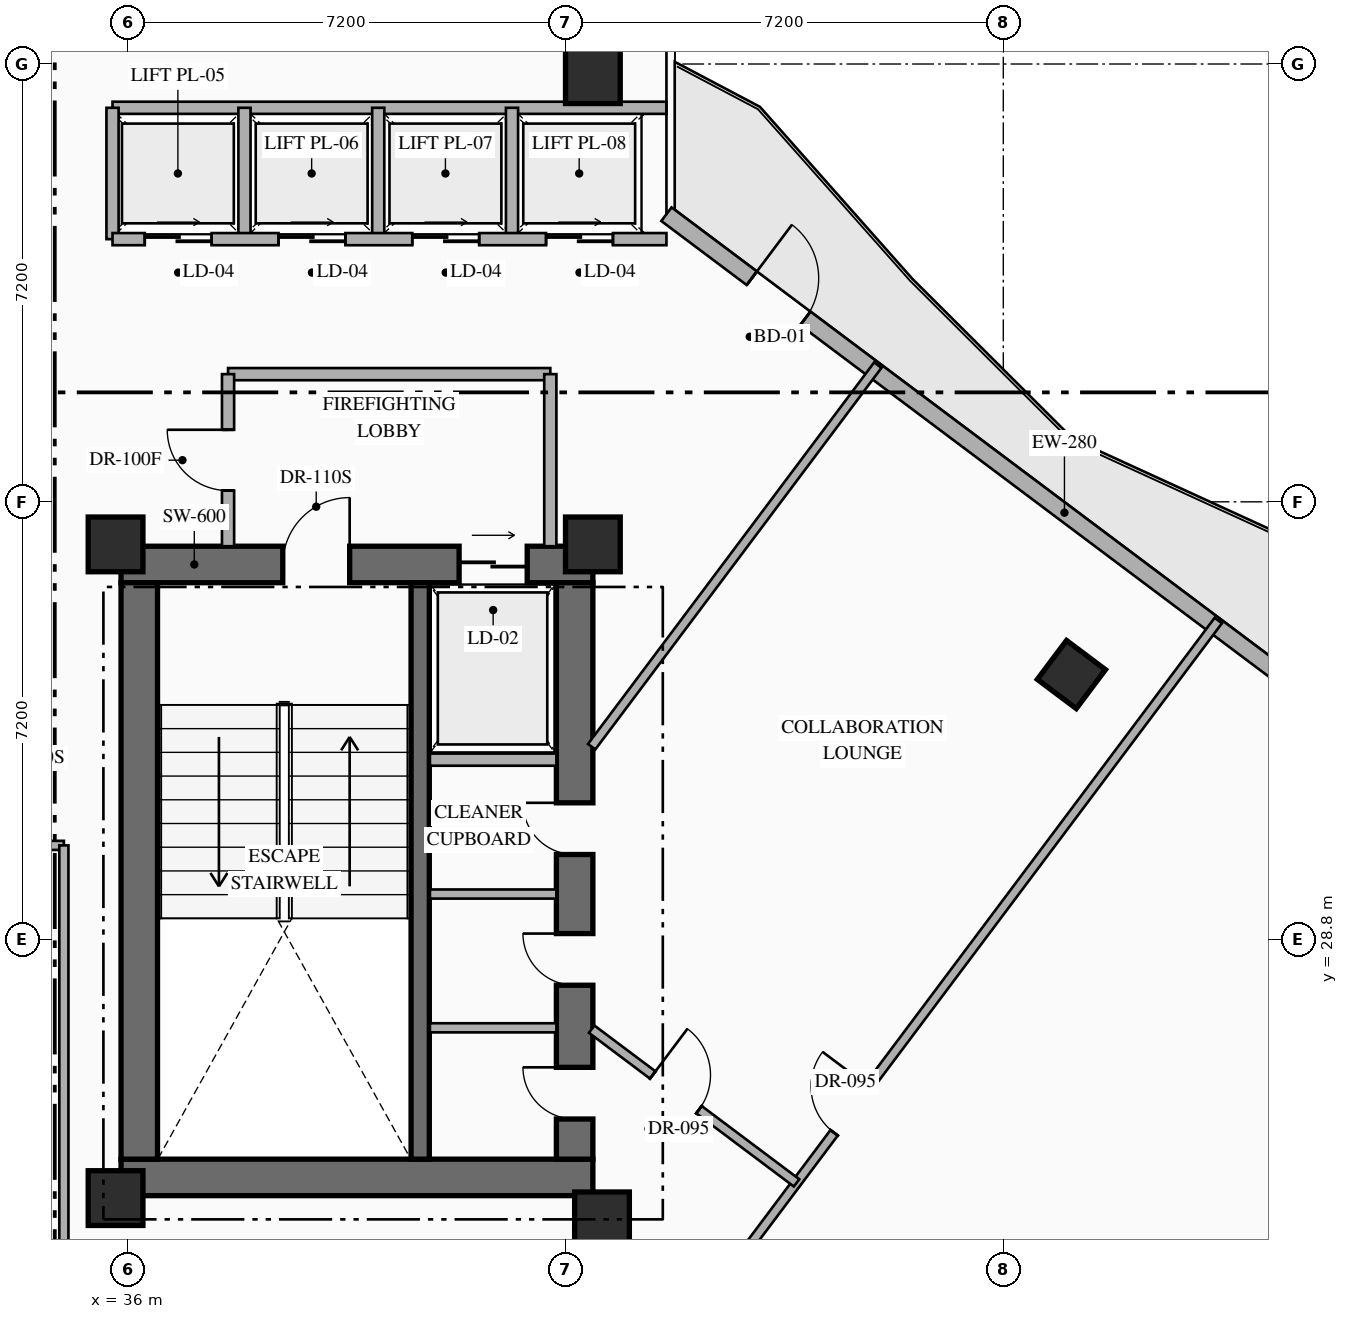
"""IFC4 building model, lengths in metres.
Left out: names, types, materials, properties, quantities, classifications, styles, units other than length and angle.
Written with IfcOpenShell. Run it as: python <this file> out.ifc"""

import sys

from ifc_helpers import new_model, si_unit, direction, frame, frame_2d, origin, origin_2d, place, context, subcontext, project, spatial, rectangle, hollow_rectangle, extrude, element, fill, save


model = new_model("IFC4")
c1 = context("Model", 3, precision=1e-05, world=origin(), true_north=direction((0.0, 1.0)))
c2 = subcontext(c1, "Body", "Model", "MODEL_VIEW")
j1 = project(units=[si_unit("LENGTHUNIT", "METRE"), si_unit("PLANEANGLEUNIT", "RADIAN")], contexts=[c1])
p1 = place(None, origin())
s1 = spatial("IfcSite", under=j1, at=p1, CompositionType="ELEMENT")
p2 = place(p1, origin())
s2 = spatial("IfcBuilding", under=s1, at=p2, CompositionType="ELEMENT")
p3 = place(p2, frame((0.0, 0.0, 170.85)))
s3 = spatial("IfcBuildingStorey", under=s2, at=p3, CompositionType="ELEMENT", Elevation=170.85)
p4 = place(p3, frame((35.89, 24.89, 0.0), z_axis=(0.0, 0.0, 1.0), x_axis=(1.0, 0.0, 0.0)))
e1 = element("IfcWall", 1, at=p4, inside=s3, PredefinedType="SHEAR", context=c2, shape_type="SweptSolid", body=[
    extrude(rectangle(XDim=7.76, YDim=0.6, at=frame_2d((3.88, 0.0))), origin(), (0.0, 0.0, 1.0), 3.6),
])
p5 = place(p3, frame((35.89, 34.97, 0.0), z_axis=(0.0, 0.0, 1.0), x_axis=(1.0, 0.0, 0.0)))
e2 = element("IfcWall", 2, at=p5, inside=s3, PredefinedType="SHEAR", context=c2, shape_type="SweptSolid", body=[
    extrude(rectangle(XDim=7.76, YDim=0.6, at=frame_2d((3.88, 0.0))), origin(), (0.0, 0.0, 1.0), 3.6),
])
p6 = place(p5, frame((2.66, 0.0, 0.0)))
e3 = element("IfcOpeningElement", 3, at=p6, cuts=e2, PredefinedType="OPENING", context=c2, shape_type="SweptSolid", body=[
    extrude(rectangle(XDim=1.1, YDim=2.2, at=frame_2d((0.55, 1.1))), frame((0.0, 0.31, 0.0), z_axis=(0.0, -1.0, 0.0), x_axis=(1.0, 0.0, 0.0)), (0.0, 0.0, 1.0), 0.62),
])
p7 = place(p5, frame((5.56, 0.0, 0.0)))
e4 = element("IfcOpeningElement", 4, at=p7, cuts=e2, PredefinedType="OPENING", context=c2, shape_type="SweptSolid", body=[
    extrude(rectangle(XDim=1.12, YDim=2.15, at=frame_2d((0.56, 1.075))), frame((0.0, 0.31, 0.0), z_axis=(0.0, -1.0, 0.0), x_axis=(1.0, 0.0, 0.0)), (0.0, 0.0, 1.0), 0.62),
])
p8 = place(p3, frame((36.19, 25.19, 0.0), z_axis=(0.0, 0.0, 1.0), x_axis=(0.0, 1.0, 0.0)))
e5 = element("IfcWall", 5, at=p8, inside=s3, PredefinedType="SHEAR", context=c2, shape_type="SweptSolid", body=[
    extrude(rectangle(XDim=9.48, YDim=0.6, at=frame_2d((4.74, 0.0))), origin(), (0.0, 0.0, 1.0), 3.6),
])
p9 = place(p3, frame((43.35, 25.19, 0.0), z_axis=(0.0, 0.0, 1.0), x_axis=(0.0, 1.0, 0.0)))
e6 = element("IfcWall", 6, at=p9, inside=s3, PredefinedType="SHEAR", context=c2, shape_type="SweptSolid", body=[
    extrude(rectangle(XDim=9.48, YDim=0.6, at=frame_2d((4.74, 0.0))), origin(), (0.0, 0.0, 1.0), 3.6),
])
p10 = place(p9, frame((0.66, 0.0, 0.0)))
e7 = element("IfcOpeningElement", 7, at=p10, cuts=e6, PredefinedType="OPENING", context=c2, shape_type="SweptSolid", body=[
    extrude(rectangle(XDim=0.85, YDim=2.08, at=frame_2d((0.425, 1.04))), frame((0.0, 0.31, 0.0), z_axis=(0.0, -1.0, 0.0), x_axis=(1.0, 0.0, 0.0)), (0.0, 0.0, 1.0), 0.62),
])
p11 = place(p9, frame((2.86, 0.0, 0.0)))
e8 = element("IfcOpeningElement", 8, at=p11, cuts=e6, PredefinedType="OPENING", context=c2, shape_type="SweptSolid", body=[
    extrude(rectangle(XDim=0.85, YDim=2.08, at=frame_2d((0.425, 1.04))), frame((0.0, 0.31, 0.0), z_axis=(0.0, -1.0, 0.0), x_axis=(1.0, 0.0, 0.0)), (0.0, 0.0, 1.0), 0.62),
])
p12 = place(p9, frame((5.01, 0.0, 0.0)))
e9 = element("IfcOpeningElement", 9, at=p12, cuts=e6, PredefinedType="OPENING", context=c2, shape_type="SweptSolid", body=[
    extrude(rectangle(XDim=0.85, YDim=2.08, at=frame_2d((0.425, 1.04))), frame((0.0, 0.31, 0.0), z_axis=(0.0, -1.0, 0.0), x_axis=(1.0, 0.0, 0.0)), (0.0, 0.0, 1.0), 0.62),
])
p13 = place(p3, frame((40.81, 25.19, 0.0), z_axis=(0.0, 0.0, 1.0), x_axis=(0.0, 1.0, 0.0)))
e10 = element("IfcWall", 10, at=p13, inside=s3, PredefinedType="SHEAR", context=c2, shape_type="SweptSolid", body=[
    extrude(rectangle(XDim=9.48, YDim=0.3, at=frame_2d((4.74, 0.0))), origin(), (0.0, 0.0, 1.0), 3.6),
])
for number, where, z_axis, x_axis in (
    (11, (35.8, 24.55, 0.0), (0.0, 0.0, 1.0), (1.0, 0.0, 0.0)),
    (12, (43.8, 24.2, 0.0), (0.0, 0.0, 1.0), (1.0, 0.0, 0.0)),
    (13, (35.8, 35.3, 0.0), (0.0, 0.0, 1.0), (1.0, 0.0, 0.0)),
    (14, (43.65, 35.3, 0.0), (0.0, 0.0, 1.0), (1.0, 0.0, 0.0)),
    (15, (43.65, 43.0, 0.0), (0.0, 0.0, 1.0), (1.0, 0.0, 0.0)),
):
    element("IfcColumn", number, at=place(p3, frame(where, z_axis=z_axis, x_axis=x_axis)), inside=s3, PredefinedType="COLUMN", context=c2, shape_type="SweptSolid", body=[
        extrude(rectangle(XDim=0.9, YDim=0.9, at=origin_2d()), origin(), (0.0, 0.0, 1.0), 3.6),
    ])
p14 = place(p3, frame((51.52, 33.16, 0.0), z_axis=(0.0, 0.0, 1.0), x_axis=(0.799999996291, -0.600000004945, 0.0)))
e16 = element("IfcColumn", 16, at=p14, inside=s3, PredefinedType="COLUMN", context=c2, shape_type="SweptSolid", body=[
    extrude(hollow_rectangle(XDim=0.8, YDim=0.8, WallThickness=0.032, at=origin_2d()), origin(), (0.0, 0.0, 1.0), 3.6),
])
p15 = place(p3, frame((44.86, 40.73, 0.0), z_axis=(0.0, 0.0, 1.0), x_axis=(0.800007624502, -0.599989833863, 0.0)))
e17 = element("IfcWall", 17, at=p15, inside=s3, PredefinedType="STANDARD", context=c2, shape_type="SweptSolid", body=[
    extrude(rectangle(XDim=19.212, YDim=0.28, at=frame_2d((9.606, 0.0))), origin(), (0.0, 0.0, 1.0), 3.35),
])
p16 = place(p15, frame((1.755, 0.0, 0.0)))
e18 = element("IfcOpeningElement", 18, at=p16, cuts=e17, PredefinedType="OPENING", context=c2, shape_type="SweptSolid", body=[
    extrude(rectangle(XDim=1.1, YDim=2.2, at=frame_2d((0.55, 1.1))), frame((0.0, 0.15, 0.0), z_axis=(0.0, -1.0, 0.0), x_axis=(1.0, 0.0, 0.0)), (0.0, 0.0, 1.0), 0.3),
])
p17 = place(p15, frame((13.509, 0.0, 0.85)))
e19 = element("IfcOpeningElement", 19, at=p17, cuts=e17, PredefinedType="OPENING", context=c2, shape_type="SweptSolid", body=[
    extrude(rectangle(XDim=1.8, YDim=2.1, at=frame_2d((0.9, 1.05))), frame((0.0, 0.15, 0.0), z_axis=(0.0, -1.0, 0.0), x_axis=(1.0, 0.0, 0.0)), (0.0, 0.0, 1.0), 0.3),
])
p18 = place(p3, frame((40.97, 31.76, 0.0), z_axis=(0.0, 0.0, 1.0), x_axis=(1.0, 0.0, 0.0)))
e20 = element("IfcWall", 20, at=p18, inside=s3, PredefinedType="STANDARD", context=c2, shape_type="SweptSolid", body=[
    extrude(rectangle(XDim=2.08, YDim=0.2, at=frame_2d((1.04, 0.0))), origin(), (0.0, 0.0, 1.0), 3.35),
])
for number, where, z_axis, x_axis in (
    (21, (40.97, 27.35, 0.0), (0.0, 0.0, 1.0), (1.0, 0.0, 0.0)),
    (22, (40.97, 29.55, 0.0), (0.0, 0.0, 1.0), (1.0, 0.0, 0.0)),
):
    element("IfcWall", number, at=place(p3, frame(where, z_axis=z_axis, x_axis=x_axis)), inside=s3, PredefinedType="PARTITIONING", context=c2, shape_type="SweptSolid", body=[
        extrude(rectangle(XDim=2.08, YDim=0.15, at=frame_2d((1.04, 0.0))), origin(), (0.0, 0.0, 1.0), 3.35),
    ])
p19 = place(p3, frame((37.65, 38.1, 0.0), z_axis=(0.0, 0.0, 1.0), x_axis=(1.0, 0.0, 0.0)))
e23 = element("IfcWall", 23, at=p19, inside=s3, PredefinedType="STANDARD", context=c2, shape_type="SweptSolid", body=[
    extrude(rectangle(XDim=5.3, YDim=0.2, at=frame_2d((2.65, 0.0))), origin(), (0.0, 0.0, 1.0), 3.35),
])
p20 = place(p3, frame((42.95, 35.27, 0.0), z_axis=(0.0, 0.0, 1.0), x_axis=(0.0, 1.0, 0.0)))
e24 = element("IfcWall", 24, at=p20, inside=s3, PredefinedType="STANDARD", context=c2, shape_type="SweptSolid", body=[
    extrude(rectangle(XDim=2.83, YDim=0.2, at=frame_2d((1.415, 0.0))), origin(), (0.0, 0.0, 1.0), 3.35),
])
p21 = place(p3, frame((37.65, 35.27, 0.0), z_axis=(0.0, 0.0, 1.0), x_axis=(0.0, 1.0, 0.0)))
e25 = element("IfcWall", 25, at=p21, inside=s3, PredefinedType="STANDARD", context=c2, shape_type="SweptSolid", body=[
    extrude(rectangle(XDim=2.83, YDim=0.2, at=frame_2d((1.415, 0.0))), origin(), (0.0, 0.0, 1.0), 3.35),
])
p22 = place(p21, frame((0.915, 0.0, 0.0)))
e26 = element("IfcOpeningElement", 26, at=p22, cuts=e25, PredefinedType="OPENING", context=c2, shape_type="SweptSolid", body=[
    extrude(rectangle(XDim=1.0, YDim=2.2, at=frame_2d((0.5, 1.1))), frame((0.0, 0.11, 0.0), z_axis=(0.0, -1.0, 0.0), x_axis=(1.0, 0.0, 0.0)), (0.0, 0.0, 1.0), 0.22),
])
p23 = place(p3, frame((35.75, 42.48, 0.0), z_axis=(0.0, 0.0, 1.0), x_axis=(1.0, 0.0, 0.0)))
e27 = element("IfcWall", 27, at=p23, inside=s3, PredefinedType="STANDARD", context=c2, shape_type="SweptSolid", body=[
    extrude(rectangle(XDim=9.11, YDim=0.2, at=frame_2d((4.555, 0.0))), origin(), (0.0, 0.0, 1.0), 3.35),
])
for number, where, z_axis, x_axis in (
    (28, (35.75, 40.32, 0.0), (0.0, 0.0, 1.0), (0.0, 1.0, 0.0)),
    (29, (37.92, 40.32, 0.0), (0.0, 0.0, 1.0), (0.0, 1.0, 0.0)),
    (30, (40.12, 40.32, 0.0), (0.0, 0.0, 1.0), (0.0, 1.0, 0.0)),
    (31, (42.32, 40.32, 0.0), (0.0, 0.0, 1.0), (0.0, 1.0, 0.0)),
):
    element("IfcWall", number, at=place(p3, frame(where, z_axis=z_axis, x_axis=x_axis)), inside=s3, PredefinedType="STANDARD", context=c2, shape_type="SweptSolid", body=[
        extrude(rectangle(XDim=2.16, YDim=0.2, at=frame_2d((1.08, 0.0))), origin(), (0.0, 0.0, 1.0), 3.35),
    ])
p24 = place(p3, frame((35.75, 40.32, 0.0), z_axis=(0.0, 0.0, 1.0), x_axis=(1.0, 0.0, 0.0)))
e32 = element("IfcWall", 32, at=p24, inside=s3, PredefinedType="STANDARD", context=c2, shape_type="SweptSolid", body=[
    extrude(rectangle(XDim=9.11, YDim=0.2, at=frame_2d((4.555, 0.0))), origin(), (0.0, 0.0, 1.0), 3.35),
])
p25 = place(p24, frame((0.53, 0.0, 0.0)))
e33 = element("IfcOpeningElement", 33, at=p25, cuts=e32, PredefinedType="OPENING", context=c2, shape_type="SweptSolid", body=[
    extrude(rectangle(XDim=1.1, YDim=2.18, at=frame_2d((0.55, 1.09))), frame((0.0, 0.11, 0.0), z_axis=(0.0, -1.0, 0.0), x_axis=(1.0, 0.0, 0.0)), (0.0, 0.0, 1.0), 0.22),
])
p26 = place(p24, frame((2.73, 0.0, 0.0)))
e34 = element("IfcOpeningElement", 34, at=p26, cuts=e32, PredefinedType="OPENING", context=c2, shape_type="SweptSolid", body=[
    extrude(rectangle(XDim=1.1, YDim=2.18, at=frame_2d((0.55, 1.09))), frame((0.0, 0.11, 0.0), z_axis=(0.0, -1.0, 0.0), x_axis=(1.0, 0.0, 0.0)), (0.0, 0.0, 1.0), 0.22),
])
p27 = place(p24, frame((4.93, 0.0, 0.0)))
e35 = element("IfcOpeningElement", 35, at=p27, cuts=e32, PredefinedType="OPENING", context=c2, shape_type="SweptSolid", body=[
    extrude(rectangle(XDim=1.1, YDim=2.18, at=frame_2d((0.55, 1.09))), frame((0.0, 0.11, 0.0), z_axis=(0.0, -1.0, 0.0), x_axis=(1.0, 0.0, 0.0)), (0.0, 0.0, 1.0), 0.22),
])
p28 = place(p24, frame((7.13, 0.0, 0.0)))
e36 = element("IfcOpeningElement", 36, at=p28, cuts=e32, PredefinedType="OPENING", context=c2, shape_type="SweptSolid", body=[
    extrude(rectangle(XDim=1.1, YDim=2.18, at=frame_2d((0.55, 1.09))), frame((0.0, 0.11, 0.0), z_axis=(0.0, -1.0, 0.0), x_axis=(1.0, 0.0, 0.0)), (0.0, 0.0, 1.0), 0.22),
])
p29 = place(p3, frame((25.55, 30.35, 0.0), z_axis=(0.0, 0.0, 1.0), x_axis=(1.0, 0.0, 0.0)))
e37 = element("IfcWall", 37, at=p29, inside=s3, PredefinedType="PARTITIONING", context=c2, shape_type="SweptSolid", body=[
    extrude(rectangle(XDim=9.4, YDim=0.15, at=frame_2d((4.7, 0.0))), origin(), (0.0, 0.0, 1.0), 3.35),
])
p30 = place(p29, frame((7.638, 0.0, 0.0)))
e38 = element("IfcOpeningElement", 38, at=p30, cuts=e37, PredefinedType="OPENING", context=c2, shape_type="SweptSolid", body=[
    extrude(rectangle(XDim=1.0, YDim=2.15, at=frame_2d((0.5, 1.075))), frame((0.0, 0.085, 0.0), z_axis=(0.0, -1.0, 0.0), x_axis=(1.0, 0.0, 0.0)), (0.0, 0.0, 1.0), 0.17),
])
p31 = place(p3, frame((34.95, 23.2, 0.0), z_axis=(0.0, 0.0, 1.0), x_axis=(0.0, 1.0, 0.0)))
e39 = element("IfcWall", 39, at=p31, inside=s3, PredefinedType="PARTITIONING", context=c2, shape_type="SweptSolid", body=[
    extrude(rectangle(XDim=7.15, YDim=0.15, at=frame_2d((3.575, 0.0))), origin(), (0.0, 0.0, 1.0), 3.35),
])
p32 = place(p3, frame((41.87, 17.96, 0.0), z_axis=(0.0, 0.0, 1.0), x_axis=(0.599994172676, 0.80000437046, 0.0)))
e40 = element("IfcWall", 40, at=p32, inside=s3, PredefinedType="PARTITIONING", context=c2, shape_type="SweptSolid", body=[
    extrude(rectangle(XDim=20.11, YDim=0.15, at=frame_2d((10.055, 0.0))), origin(), (0.0, 0.0, 1.0), 3.35),
])
p33 = place(p32, frame((9.58, 0.0, 0.0)))
e41 = element("IfcOpeningElement", 41, at=p33, cuts=e40, PredefinedType="OPENING", context=c2, shape_type="SweptSolid", body=[
    extrude(rectangle(XDim=0.95, YDim=2.15, at=frame_2d((0.475, 1.075))), frame((0.0, 0.085, 0.0), z_axis=(0.0, -1.0, 0.0), x_axis=(1.0, 0.0, 0.0)), (0.0, 0.0, 1.0), 0.17),
])
p34 = place(p3, frame((43.63, 27.328, 0.0), z_axis=(0.0, 0.0, 1.0), x_axis=(0.799972182084, -0.600037088764, 0.0)))
e42 = element("IfcWall", 42, at=p34, inside=s3, PredefinedType="PARTITIONING", context=c2, shape_type="SweptSolid", body=[
    extrude(rectangle(XDim=4.213, YDim=0.15, at=frame_2d((2.106, 0.0))), origin(), (0.0, 0.0, 1.0), 3.045),
])
p35 = place(p34, frame((1.256, 0.0, 0.0)))
e43 = element("IfcOpeningElement", 43, at=p35, cuts=e42, PredefinedType="OPENING", context=c2, shape_type="SweptSolid", body=[
    extrude(rectangle(XDim=0.95, YDim=2.15, at=frame_2d((0.475, 1.075))), frame((0.0, 0.085, 0.0), z_axis=(0.0, -1.0, 0.0), x_axis=(1.0, 0.0, 0.0)), (0.0, 0.0, 1.0), 0.17),
])
p36 = place(p3, frame((43.63, 31.973, 0.0), z_axis=(0.0, 0.0, 1.0), x_axis=(0.599975099311, 0.800018674911, 0.0)))
e44 = element("IfcWall", 44, at=p36, inside=s3, PredefinedType="PARTITIONING", context=c2, shape_type="SweptSolid", body=[
    extrude(rectangle(XDim=7.844, YDim=0.15, at=frame_2d((3.922, 0.0))), origin(), (0.0, 0.0, 1.0), 3.35),
])
p37 = place(p3, frame((27.91, 26.68, 0.0), z_axis=(0.0, 0.0, 1.0), x_axis=(0.800005938517, -0.599992081896, 0.0)))
e45 = element("IfcWall", 45, at=p37, inside=s3, PredefinedType="PARTITIONING", context=c2, shape_type="SweptSolid", body=[
    extrude(rectangle(XDim=14.8, YDim=0.15, at=frame_2d((7.4, 0.0))), origin(), (0.0, 0.0, 1.0), 3.35),
])
p38 = place(p37, frame((9.281, 0.0, 0.0)))
e46 = element("IfcOpeningElement", 46, at=p38, cuts=e45, PredefinedType="OPENING", context=c2, shape_type="SweptSolid", body=[
    extrude(rectangle(XDim=0.95, YDim=2.15, at=frame_2d((0.475, 1.075))), frame((0.0, 0.085, 0.0), z_axis=(0.0, -1.0, 0.0), x_axis=(1.0, 0.0, 0.0)), (0.0, 0.0, 1.0), 0.17),
])
p39 = place(p16, origin())
e47 = element("IfcDoor", 47, at=p39, inside=s3, OperationType="SINGLE_SWING_LEFT", PredefinedType="DOOR", context=c2, shape_type="SweptSolid", body=[
    extrude(rectangle(XDim=1.1, YDim=2.2, at=frame_2d((0.55, 1.1))), frame((0.0, 0.025, 0.0), z_axis=(0.0, -1.0, 0.0), x_axis=(1.0, 0.0, 0.0)), (0.0, 0.0, 1.0), 0.05),
])
fill(e18, e47)
p40 = place(p6, origin())
e48 = element("IfcDoor", 48, at=p40, inside=s3, OperationType="SINGLE_SWING_RIGHT", PredefinedType="DOOR", context=c2, shape_type="SweptSolid", body=[
    extrude(rectangle(XDim=1.1, YDim=2.2, at=frame_2d((0.55, 1.1))), frame((0.0, 0.025, 0.0), z_axis=(0.0, -1.0, 0.0), x_axis=(1.0, 0.0, 0.0)), (0.0, 0.0, 1.0), 0.05),
])
fill(e3, e48)
p41 = place(p7, origin())
e49 = element("IfcDoor", 49, at=p41, inside=s3, OperationType="SLIDING_TO_RIGHT", PredefinedType="USERDEFINED", context=c2, shape_type="SweptSolid", body=[
    extrude(rectangle(XDim=1.12, YDim=2.15, at=frame_2d((0.56, 1.075))), frame((0.0, 0.025, 0.0), z_axis=(0.0, -1.0, 0.0), x_axis=(1.0, 0.0, 0.0)), (0.0, 0.0, 1.0), 0.05),
])
fill(e4, e49)
p42 = place(p10, origin())
e50 = element("IfcDoor", 50, at=p42, inside=s3, OperationType="SINGLE_SWING_RIGHT", PredefinedType="DOOR", context=c2, shape_type="SweptSolid", body=[
    extrude(rectangle(XDim=0.85, YDim=2.08, at=frame_2d((0.425, 1.04))), frame((0.0, 0.025, 0.0), z_axis=(0.0, -1.0, 0.0), x_axis=(1.0, 0.0, 0.0)), (0.0, 0.0, 1.0), 0.05),
])
fill(e7, e50)
p43 = place(p11, origin())
e51 = element("IfcDoor", 51, at=p43, inside=s3, OperationType="SINGLE_SWING_RIGHT", PredefinedType="DOOR", context=c2, shape_type="SweptSolid", body=[
    extrude(rectangle(XDim=0.85, YDim=2.08, at=frame_2d((0.425, 1.04))), frame((0.0, 0.025, 0.0), z_axis=(0.0, -1.0, 0.0), x_axis=(1.0, 0.0, 0.0)), (0.0, 0.0, 1.0), 0.05),
])
fill(e8, e51)
p44 = place(p12, origin())
e52 = element("IfcDoor", 52, at=p44, inside=s3, OperationType="SINGLE_SWING_RIGHT", PredefinedType="DOOR", context=c2, shape_type="SweptSolid", body=[
    extrude(rectangle(XDim=0.85, YDim=2.08, at=frame_2d((0.425, 1.04))), frame((0.0, 0.025, 0.0), z_axis=(0.0, -1.0, 0.0), x_axis=(1.0, 0.0, 0.0)), (0.0, 0.0, 1.0), 0.05),
])
fill(e9, e52)
p45 = place(p22, origin())
e53 = element("IfcDoor", 53, at=p45, inside=s3, OperationType="SINGLE_SWING_RIGHT", PredefinedType="DOOR", context=c2, shape_type="SweptSolid", body=[
    extrude(rectangle(XDim=1.0, YDim=2.2, at=frame_2d((0.5, 1.1))), frame((0.0, 0.025, 0.0), z_axis=(0.0, -1.0, 0.0), x_axis=(1.0, 0.0, 0.0)), (0.0, 0.0, 1.0), 0.05),
])
fill(e26, e53)
p46 = place(p25, origin())
e54 = element("IfcDoor", 54, at=p46, inside=s3, OperationType="SLIDING_TO_RIGHT", PredefinedType="USERDEFINED", context=c2, shape_type="SweptSolid", body=[
    extrude(rectangle(XDim=1.1, YDim=2.18, at=frame_2d((0.55, 1.09))), frame((0.0, 0.025, 0.0), z_axis=(0.0, -1.0, 0.0), x_axis=(1.0, 0.0, 0.0)), (0.0, 0.0, 1.0), 0.05),
])
fill(e33, e54)
p47 = place(p26, origin())
e55 = element("IfcDoor", 55, at=p47, inside=s3, OperationType="SLIDING_TO_RIGHT", PredefinedType="USERDEFINED", context=c2, shape_type="SweptSolid", body=[
    extrude(rectangle(XDim=1.1, YDim=2.18, at=frame_2d((0.55, 1.09))), frame((0.0, 0.025, 0.0), z_axis=(0.0, -1.0, 0.0), x_axis=(1.0, 0.0, 0.0)), (0.0, 0.0, 1.0), 0.05),
])
fill(e34, e55)
p48 = place(p27, origin())
e56 = element("IfcDoor", 56, at=p48, inside=s3, OperationType="SLIDING_TO_RIGHT", PredefinedType="USERDEFINED", context=c2, shape_type="SweptSolid", body=[
    extrude(rectangle(XDim=1.1, YDim=2.18, at=frame_2d((0.55, 1.09))), frame((0.0, 0.025, 0.0), z_axis=(0.0, -1.0, 0.0), x_axis=(1.0, 0.0, 0.0)), (0.0, 0.0, 1.0), 0.05),
])
fill(e35, e56)
p49 = place(p28, origin())
e57 = element("IfcDoor", 57, at=p49, inside=s3, OperationType="SLIDING_TO_RIGHT", PredefinedType="USERDEFINED", context=c2, shape_type="SweptSolid", body=[
    extrude(rectangle(XDim=1.1, YDim=2.18, at=frame_2d((0.55, 1.09))), frame((0.0, 0.025, 0.0), z_axis=(0.0, -1.0, 0.0), x_axis=(1.0, 0.0, 0.0)), (0.0, 0.0, 1.0), 0.05),
])
fill(e36, e57)
p50 = place(p33, origin())
e58 = element("IfcDoor", 58, at=p50, inside=s3, OperationType="SINGLE_SWING_RIGHT", PredefinedType="DOOR", context=c2, shape_type="SweptSolid", body=[
    extrude(rectangle(XDim=0.95, YDim=2.15, at=frame_2d((0.475, 1.075))), frame((0.0, 0.025, 0.0), z_axis=(0.0, -1.0, 0.0), x_axis=(1.0, 0.0, 0.0)), (0.0, 0.0, 1.0), 0.05),
])
fill(e41, e58)
p51 = place(p35, origin())
e59 = element("IfcDoor", 59, at=p51, inside=s3, OperationType="SINGLE_SWING_LEFT", PredefinedType="DOOR", context=c2, shape_type="SweptSolid", body=[
    extrude(rectangle(XDim=0.95, YDim=2.15, at=frame_2d((0.475, 1.075))), frame((0.0, 0.025, 0.0), z_axis=(0.0, -1.0, 0.0), x_axis=(1.0, 0.0, 0.0)), (0.0, 0.0, 1.0), 0.05),
])
fill(e43, e59)
save(model, sys.argv[1])
